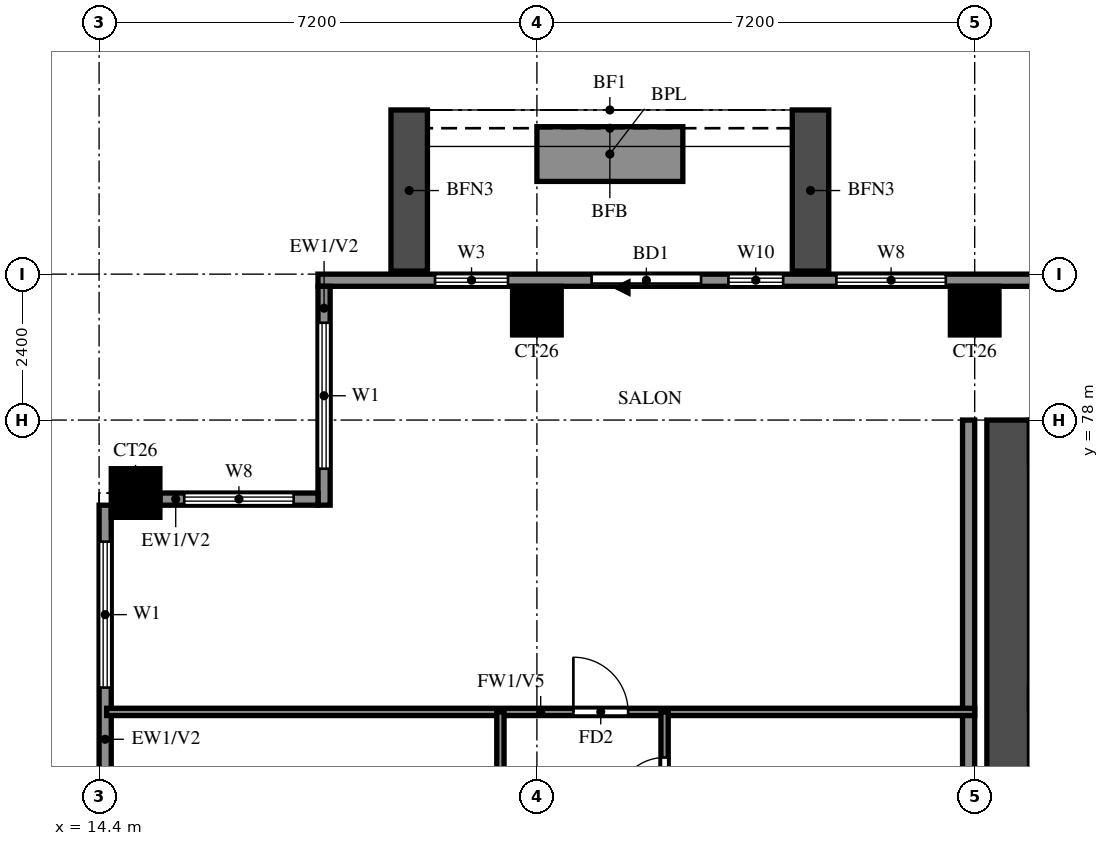
"""IFC4 building model, lengths in metres.
Left out: names, types, materials, properties, quantities, classifications, styles, units other than length and angle.
Written with IfcOpenShell. Run it as: python <this file> out.ifc"""

import sys

from ifc_helpers import new_model, si_unit, direction, frame, frame_2d, origin, origin_2d, place, context, subcontext, project, spatial, rectangle, extrude, source, transform, mapped, element, fill, save


model = new_model("IFC4")
c1 = context("Model", 3, precision=1e-05, world=origin(), true_north=direction((0.0, 1.0)))
c2 = subcontext(c1, "Body", "Model", "MODEL_VIEW")
j1 = project(units=[si_unit("LENGTHUNIT", "METRE"), si_unit("PLANEANGLEUNIT", "RADIAN")], contexts=[c1])
p1 = place(None, origin())
s1 = spatial("IfcSite", under=j1, at=p1, CompositionType="ELEMENT")
p2 = place(p1, origin())
s2 = spatial("IfcBuilding", under=s1, at=p2, CompositionType="ELEMENT")
p3 = place(p2, frame((0.0, 0.0, 174.5)))
s3 = spatial("IfcBuildingStorey", under=s2, at=p3, CompositionType="ELEMENT", Elevation=174.5)
m1 = source(origin(), c2, "Body", "SweptSolid", [
    extrude(rectangle(XDim=0.8, YDim=0.8, at=origin_2d()), origin(), (0.0, 0.0, 1.0), 3.2),
])
for number, where, z_axis, x_axis in (
    (1, (15.0, 76.8, 0.0), (0.0, 0.0, 1.0), (1.0, 0.0, 0.0)),
    (2, (21.6, 79.8, 0.0), (0.0, 0.0, 1.0), (1.0, 0.0, 0.0)),
    (3, (28.8, 79.8, 0.0), (0.0, 0.0, 1.0), (1.0, 0.0, 0.0)),
):
    element("IfcColumn", number, at=place(p3, frame(where, z_axis=z_axis, x_axis=x_axis)), inside=s3, PredefinedType="COLUMN", context=c2, shape_type="MappedRepresentation", body=[
        mapped(m1, transform((0.0, 0.0, 0.0))),
    ])
p4 = place(p3, frame((29.35, 66.1, 0.0), z_axis=(0.0, 0.0, 1.0), x_axis=(0.0, 1.0, 0.0)))
e4 = element("IfcWall", 4, at=p4, inside=s3, PredefinedType="SHEAR", context=c2, shape_type="SweptSolid", body=[
    extrude(rectangle(XDim=11.9, YDim=0.7, at=frame_2d((5.95, 0.0))), origin(), (0.0, 0.0, 1.0), 3.2),
])
p5 = place(p3, frame((82.6, 80.3, 0.0), z_axis=(0.0, 0.0, 1.0), x_axis=(-1.0, 0.0, 0.0)))
e5 = element("IfcWall", 5, at=p5, inside=s3, PredefinedType="SOLIDWALL", context=c2, shape_type="SweptSolid", body=[
    extrude(rectangle(XDim=64.6, YDim=0.2, at=frame_2d((32.3, 0.0))), origin(), (0.0, 0.0, 1.0), 3.2),
])
p6 = place(p5, frame((58.3, 0.0, 0.0)))
e6 = element("IfcOpeningElement", 6, at=p6, cuts=e5, PredefinedType="OPENING", context=c2, shape_type="SweptSolid", body=[
    extrude(rectangle(XDim=1.8, YDim=2.4, at=frame_2d((0.9, 1.2))), frame((0.0, 0.11, 0.0), z_axis=(0.0, -1.0, 0.0), x_axis=(1.0, 0.0, 0.0)), (0.0, 0.0, 1.0), 0.22),
])
p7 = place(p5, frame((54.275, 0.0, 0.6)))
e7 = element("IfcOpeningElement", 7, at=p7, cuts=e5, PredefinedType="OPENING", context=c2, shape_type="SweptSolid", body=[
    extrude(rectangle(XDim=1.8, YDim=2.4, at=frame_2d((0.9, 1.2))), frame((0.0, 0.11, 0.0), z_axis=(0.0, -1.0, 0.0), x_axis=(1.0, 0.0, 0.0)), (0.0, 0.0, 1.0), 0.22),
])
p8 = place(p5, frame((56.95, 0.0, 0.6)))
e8 = element("IfcOpeningElement", 8, at=p8, cuts=e5, PredefinedType="OPENING", context=c2, shape_type="SweptSolid", body=[
    extrude(rectangle(XDim=0.9, YDim=2.4, at=frame_2d((0.45, 1.2))), frame((0.0, 0.11, 0.0), z_axis=(0.0, -1.0, 0.0), x_axis=(1.0, 0.0, 0.0)), (0.0, 0.0, 1.0), 0.22),
])
p9 = place(p5, frame((61.475, 0.0, 0.6)))
e9 = element("IfcOpeningElement", 9, at=p9, cuts=e5, PredefinedType="OPENING", context=c2, shape_type="SweptSolid", body=[
    extrude(rectangle(XDim=1.2, YDim=2.4, at=frame_2d((0.6, 1.2))), frame((0.0, 0.11, 0.0), z_axis=(0.0, -1.0, 0.0), x_axis=(1.0, 0.0, 0.0)), (0.0, 0.0, 1.0), 0.22),
])
p10 = place(p5, frame((0.725, 0.0, 0.6)))
e10 = element("IfcOpeningElement", 10, at=p10, cuts=e5, PredefinedType="OPENING", context=c2, shape_type="SweptSolid", body=[
    extrude(rectangle(XDim=1.8, YDim=2.4, at=frame_2d((0.9, 1.2))), frame((0.0, 0.11, 0.0), z_axis=(0.0, -1.0, 0.0), x_axis=(1.0, 0.0, 0.0)), (0.0, 0.0, 1.0), 0.22),
])
p11 = place(p5, frame((4.35, 0.0, 0.6)))
e11 = element("IfcOpeningElement", 11, at=p11, cuts=e5, PredefinedType="OPENING", context=c2, shape_type="SweptSolid", body=[
    extrude(rectangle(XDim=2.4, YDim=2.4, at=frame_2d((1.2, 1.2))), frame((0.0, 0.11, 0.0), z_axis=(0.0, -1.0, 0.0), x_axis=(1.0, 0.0, 0.0)), (0.0, 0.0, 1.0), 0.22),
])
p12 = place(p5, frame((7.25, 0.0, 0.6)))
e12 = element("IfcOpeningElement", 12, at=p12, cuts=e5, PredefinedType="OPENING", context=c2, shape_type="SweptSolid", body=[
    extrude(rectangle(XDim=2.4, YDim=2.4, at=frame_2d((1.2, 1.2))), frame((0.0, 0.11, 0.0), z_axis=(0.0, -1.0, 0.0), x_axis=(1.0, 0.0, 0.0)), (0.0, 0.0, 1.0), 0.22),
])
p13 = place(p3, frame((18.1, 80.2, 0.0), z_axis=(0.0, 0.0, 1.0), x_axis=(0.0, -1.0, 0.0)))
e13 = element("IfcWall", 13, at=p13, inside=s3, PredefinedType="SOLIDWALL", context=c2, shape_type="SweptSolid", body=[
    extrude(rectangle(XDim=3.6, YDim=0.2, at=frame_2d((1.8, 0.0))), origin(), (0.0, 0.0, 1.0), 3.2),
])
p14 = place(p13, frame((0.6, 0.0, 0.6)))
e14 = element("IfcOpeningElement", 14, at=p14, cuts=e13, PredefinedType="OPENING", context=c2, shape_type="SweptSolid", body=[
    extrude(rectangle(XDim=2.4, YDim=2.4, at=frame_2d((1.2, 1.2))), frame((0.0, 0.11, 0.0), z_axis=(0.0, -1.0, 0.0), x_axis=(1.0, 0.0, 0.0)), (0.0, 0.0, 1.0), 0.22),
])
p15 = place(p3, frame((18.0, 76.7, 0.0), z_axis=(0.0, 0.0, 1.0), x_axis=(-1.0, 0.0, 0.0)))
e15 = element("IfcWall", 15, at=p15, inside=s3, PredefinedType="SOLIDWALL", context=c2, shape_type="SweptSolid", body=[
    extrude(rectangle(XDim=2.6, YDim=0.2, at=frame_2d((1.3, 0.0))), origin(), (0.0, 0.0, 1.0), 3.2),
])
p16 = place(p15, frame((0.4, 0.0, 0.6)))
e16 = element("IfcOpeningElement", 16, at=p16, cuts=e15, PredefinedType="OPENING", context=c2, shape_type="SweptSolid", body=[
    extrude(rectangle(XDim=1.8, YDim=2.4, at=frame_2d((0.9, 1.2))), frame((0.0, 0.11, 0.0), z_axis=(0.0, -1.0, 0.0), x_axis=(1.0, 0.0, 0.0)), (0.0, 0.0, 1.0), 0.22),
])
p17 = place(p3, frame((14.5, 76.6, 0.0), z_axis=(0.0, 0.0, 1.0), x_axis=(0.0, -1.0, 0.0)))
e17 = element("IfcWall", 17, at=p17, inside=s3, PredefinedType="SOLIDWALL", context=c2, shape_type="SweptSolid", body=[
    extrude(rectangle(XDim=7.0, YDim=0.2, at=frame_2d((3.5, 0.0))), origin(), (0.0, 0.0, 1.0), 3.2),
])
p18 = place(p17, frame((4.575, 0.0, 1.5)))
e18 = element("IfcOpeningElement", 18, at=p18, cuts=e17, PredefinedType="OPENING", context=c2, shape_type="SweptSolid", body=[
    extrude(rectangle(XDim=0.9, YDim=0.9, at=frame_2d((0.45, 0.45))), frame((0.0, 0.11, 0.0), z_axis=(0.0, -1.0, 0.0), x_axis=(1.0, 0.0, 0.0)), (0.0, 0.0, 1.0), 0.22),
])
p19 = place(p17, frame((0.6, 0.0, 0.6)))
e19 = element("IfcOpeningElement", 19, at=p19, cuts=e17, PredefinedType="OPENING", context=c2, shape_type="SweptSolid", body=[
    extrude(rectangle(XDim=2.4, YDim=2.4, at=frame_2d((1.2, 1.2))), frame((0.0, 0.11, 0.0), z_axis=(0.0, -1.0, 0.0), x_axis=(1.0, 0.0, 0.0)), (0.0, 0.0, 1.0), 0.22),
])
for number, where, z_axis, x_axis in (
    (20, (26.1, 80.45, 0.0), (0.0, 0.0, 1.0), (0.0, 1.0, 0.0)),
    (21, (19.5, 80.45, 0.0), (0.0, 0.0, 1.0), (0.0, 1.0, 0.0)),
):
    element("IfcWall", number, at=place(p3, frame(where, z_axis=z_axis, x_axis=x_axis)), inside=s3, PredefinedType="SOLIDWALL", context=c2, shape_type="SweptSolid", body=[
        extrude(rectangle(XDim=2.65, YDim=0.6, at=frame_2d((1.325, 0.0))), origin(), (0.0, 0.0, 1.0), 2.85),
    ])
p20 = place(p3, frame((24.0, 82.375, 0.0), z_axis=(0.0, 0.0, 1.0), x_axis=(-1.0, 0.0, 0.0)))
e22 = element("IfcWall", 22, at=p20, inside=s3, PredefinedType="SOLIDWALL", context=c2, shape_type="SweptSolid", body=[
    extrude(rectangle(XDim=2.4, YDim=0.9, at=frame_2d((1.2, 0.0))), origin(), (0.0, 0.0, 1.0), 0.9),
])
p21 = place(p3, frame((28.7, 62.4, 0.0), z_axis=(0.0, 0.0, 1.0), x_axis=(0.0, 1.0, 0.0)))
e23 = element("IfcWall", 23, at=p21, inside=s3, PredefinedType="SOLIDWALL", context=c2, shape_type="SweptSolid", body=[
    extrude(rectangle(XDim=15.6, YDim=0.2, at=frame_2d((7.8, 0.0))), origin(), (0.0, 0.0, 1.0), 3.2),
])
p22 = place(p3, frame((14.525, 73.2, 0.0), z_axis=(0.0, 0.0, 1.0), x_axis=(1.0, 0.0, 0.0)))
e24 = element("IfcWall", 24, at=p22, inside=s3, PredefinedType="PARTITIONING", context=c2, shape_type="SweptSolid", body=[
    extrude(rectangle(XDim=14.275, YDim=0.12, at=frame_2d((7.138, 0.0))), origin(), (0.0, 0.0, 1.0), 2.3),
])
p23 = place(p22, frame((7.675, 0.0, 0.0)))
e25 = element("IfcOpeningElement", 25, at=p23, cuts=e24, PredefinedType="OPENING", context=c2, shape_type="SweptSolid", body=[
    extrude(rectangle(XDim=0.9, YDim=2.1, at=frame_2d((0.45, 1.05))), frame((0.0, 0.07, 0.0), z_axis=(0.0, -1.0, 0.0), x_axis=(1.0, 0.0, 0.0)), (0.0, 0.0, 1.0), 0.14),
])
p24 = place(p3, frame((21.0, 69.6, 0.0), z_axis=(0.0, 0.0, 1.0), x_axis=(0.0, 1.0, 0.0)))
e26 = element("IfcWall", 26, at=p24, inside=s3, PredefinedType="PARTITIONING", context=c2, shape_type="SweptSolid", body=[
    extrude(rectangle(XDim=3.6, YDim=0.12, at=frame_2d((1.8, 0.0))), origin(), (0.0, 0.0, 1.0), 3.2),
])
p25 = place(p3, frame((23.7, 61.2, 0.0), z_axis=(0.0, 0.0, 1.0), x_axis=(0.0, 1.0, 0.0)))
e27 = element("IfcWall", 27, at=p25, inside=s3, PredefinedType="PARTITIONING", context=c2, shape_type="SweptSolid", body=[
    extrude(rectangle(XDim=12.0, YDim=0.12, at=frame_2d((6.0, 0.0))), origin(), (0.0, 0.0, 1.0), 3.2),
])
p26 = place(p25, frame((4.2, 0.0, 0.0)))
e28 = element("IfcOpeningElement", 28, at=p26, cuts=e27, PredefinedType="OPENING", context=c2, shape_type="SweptSolid", body=[
    extrude(rectangle(XDim=0.9, YDim=2.1, at=frame_2d((0.45, 1.05))), frame((0.0, 0.07, 0.0), z_axis=(0.0, -1.0, 0.0), x_axis=(1.0, 0.0, 0.0)), (0.0, 0.0, 1.0), 0.14),
])
p27 = place(p25, frame((7.975, 0.0, 0.0)))
e29 = element("IfcOpeningElement", 29, at=p27, cuts=e27, PredefinedType="OPENING", context=c2, shape_type="SweptSolid", body=[
    extrude(rectangle(XDim=0.8, YDim=2.1, at=frame_2d((0.4, 1.05))), frame((0.0, 0.07, 0.0), z_axis=(0.0, -1.0, 0.0), x_axis=(1.0, 0.0, 0.0)), (0.0, 0.0, 1.0), 0.14),
])
p28 = place(p25, frame((10.45, 0.0, 0.0)))
e30 = element("IfcOpeningElement", 30, at=p28, cuts=e27, PredefinedType="OPENING", context=c2, shape_type="SweptSolid", body=[
    extrude(rectangle(XDim=0.8, YDim=2.1, at=frame_2d((0.4, 1.05))), frame((0.0, 0.07, 0.0), z_axis=(0.0, -1.0, 0.0), x_axis=(1.0, 0.0, 0.0)), (0.0, 0.0, 1.0), 0.14),
])
p29 = place(p6, origin())
e31 = element("IfcDoor", 31, at=p29, inside=s3, OperationType="DOUBLE_DOOR_SLIDING", PredefinedType="DOOR", context=c2, shape_type="SweptSolid", body=[
    extrude(rectangle(XDim=1.8, YDim=2.4, at=frame_2d((0.9, 1.2))), frame((0.0, 0.025, 0.0), z_axis=(0.0, -1.0, 0.0), x_axis=(1.0, 0.0, 0.0)), (0.0, 0.0, 1.0), 0.05),
])
fill(e6, e31)
p30 = place(p7, origin())
e32 = element("IfcWindow", 32, at=p30, inside=s3, PartitioningType="DOUBLE_PANEL_VERTICAL", PredefinedType="WINDOW", context=c2, shape_type="SweptSolid", body=[
    extrude(rectangle(XDim=1.8, YDim=2.4, at=frame_2d((0.9, 1.2))), frame((0.0, 0.03, 0.0), z_axis=(0.0, -1.0, 0.0), x_axis=(1.0, 0.0, 0.0)), (0.0, 0.0, 1.0), 0.06),
])
fill(e7, e32)
p31 = place(p8, origin())
e33 = element("IfcWindow", 33, at=p31, inside=s3, PartitioningType="SINGLE_PANEL", PredefinedType="WINDOW", context=c2, shape_type="SweptSolid", body=[
    extrude(rectangle(XDim=0.9, YDim=2.4, at=frame_2d((0.45, 1.2))), frame((0.0, 0.03, 0.0), z_axis=(0.0, -1.0, 0.0), x_axis=(1.0, 0.0, 0.0)), (0.0, 0.0, 1.0), 0.06),
])
fill(e8, e33)
p32 = place(p9, origin())
e34 = element("IfcWindow", 34, at=p32, inside=s3, PartitioningType="SINGLE_PANEL", PredefinedType="WINDOW", context=c2, shape_type="SweptSolid", body=[
    extrude(rectangle(XDim=1.2, YDim=2.4, at=frame_2d((0.6, 1.2))), frame((0.0, 0.03, 0.0), z_axis=(0.0, -1.0, 0.0), x_axis=(1.0, 0.0, 0.0)), (0.0, 0.0, 1.0), 0.06),
])
fill(e9, e34)
p33 = place(p14, origin())
e35 = element("IfcWindow", 35, at=p33, inside=s3, PartitioningType="DOUBLE_PANEL_VERTICAL", PredefinedType="WINDOW", context=c2, shape_type="SweptSolid", body=[
    extrude(rectangle(XDim=2.4, YDim=2.4, at=frame_2d((1.2, 1.2))), frame((0.0, 0.03, 0.0), z_axis=(0.0, -1.0, 0.0), x_axis=(1.0, 0.0, 0.0)), (0.0, 0.0, 1.0), 0.06),
])
fill(e14, e35)
p34 = place(p16, origin())
e36 = element("IfcWindow", 36, at=p34, inside=s3, PartitioningType="DOUBLE_PANEL_VERTICAL", PredefinedType="WINDOW", context=c2, shape_type="SweptSolid", body=[
    extrude(rectangle(XDim=1.8, YDim=2.4, at=frame_2d((0.9, 1.2))), frame((0.0, 0.03, 0.0), z_axis=(0.0, -1.0, 0.0), x_axis=(1.0, 0.0, 0.0)), (0.0, 0.0, 1.0), 0.06),
])
fill(e16, e36)
p35 = place(p19, origin())
e37 = element("IfcWindow", 37, at=p35, inside=s3, PartitioningType="DOUBLE_PANEL_VERTICAL", PredefinedType="WINDOW", context=c2, shape_type="SweptSolid", body=[
    extrude(rectangle(XDim=2.4, YDim=2.4, at=frame_2d((1.2, 1.2))), frame((0.0, 0.03, 0.0), z_axis=(0.0, -1.0, 0.0), x_axis=(1.0, 0.0, 0.0)), (0.0, 0.0, 1.0), 0.06),
])
fill(e19, e37)
p36 = place(p23, origin())
e38 = element("IfcDoor", 38, at=p36, inside=s3, OperationType="SINGLE_SWING_LEFT", PredefinedType="DOOR", context=c2, shape_type="SweptSolid", body=[
    extrude(rectangle(XDim=0.9, YDim=2.1, at=frame_2d((0.45, 1.05))), frame((0.0, 0.025, 0.0), z_axis=(0.0, -1.0, 0.0), x_axis=(1.0, 0.0, 0.0)), (0.0, 0.0, 1.0), 0.05),
])
fill(e25, e38)
p37 = place(p28, origin())
e39 = element("IfcDoor", 39, at=p37, inside=s3, OperationType="SINGLE_SWING_LEFT", PredefinedType="DOOR", context=c2, shape_type="SweptSolid", body=[
    extrude(rectangle(XDim=0.8, YDim=2.1, at=frame_2d((0.4, 1.05))), frame((0.0, 0.025, 0.0), z_axis=(0.0, -1.0, 0.0), x_axis=(1.0, 0.0, 0.0)), (0.0, 0.0, 1.0), 0.05),
])
fill(e30, e39)
save(model, sys.argv[1])
